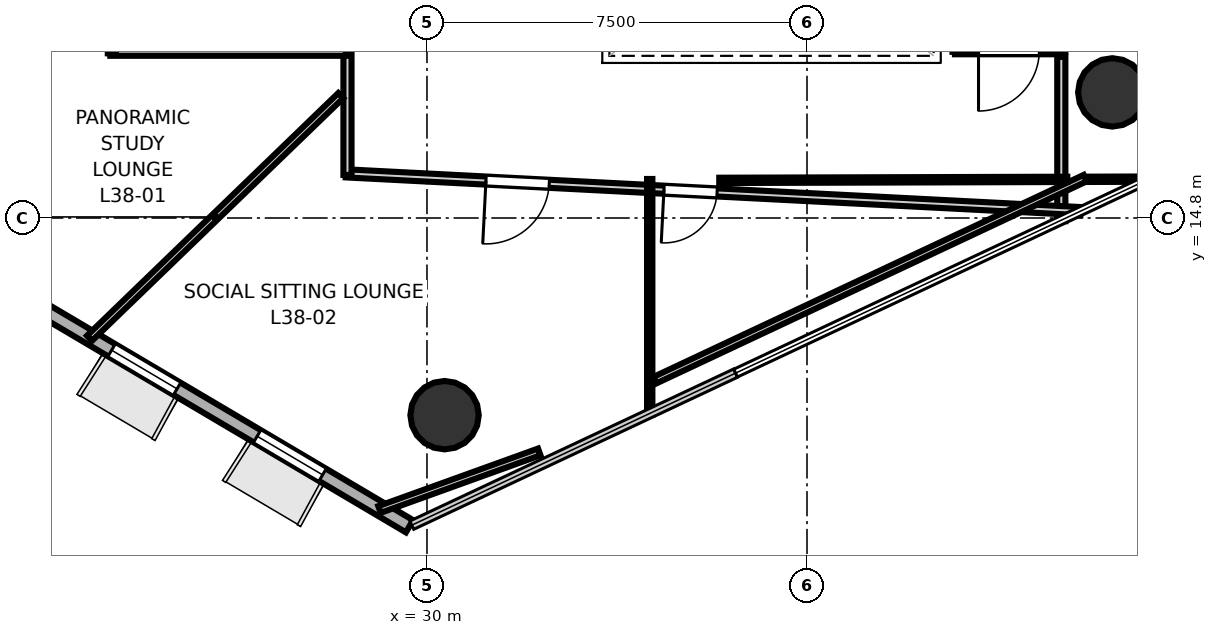
"""IFC4 building model, lengths in metres.
Left out: names, types, materials, properties, quantities, classifications, styles, units other than length and angle.
Written with IfcOpenShell. Run it as: python <this file> out.ifc"""

import sys

from ifc_helpers import new_model, si_unit, direction, frame, frame_2d, origin, origin_2d, place, context, subcontext, project, spatial, rectangle, hollow_circle, extrude, element, fill, save


model = new_model("IFC4")
c1 = context("Model", 3, precision=1e-05, world=origin(), true_north=direction((0.0, 1.0)))
c2 = subcontext(c1, "Body", "Model", "MODEL_VIEW")
j1 = project(units=[si_unit("LENGTHUNIT", "METRE"), si_unit("PLANEANGLEUNIT", "RADIAN")], contexts=[c1])
p1 = place(None, origin())
s1 = spatial("IfcSite", under=j1, at=p1, CompositionType="ELEMENT")
p2 = place(p1, origin())
s2 = spatial("IfcBuilding", under=s1, at=p2, CompositionType="ELEMENT")
p3 = place(p2, frame((0.0, 0.0, 151.3)))
s3 = spatial("IfcBuildingStorey", under=s2, at=p3, CompositionType="ELEMENT", Elevation=151.3)
for number, where, z_axis, x_axis in (
    (1, (30.347, 10.909, 0.0), (0.0, 0.0, 1.0), (1.0, 0.0, 0.0)),
    (2, (43.525, 17.279, 0.0), (0.0, 0.0, 1.0), (1.0, 0.0, 0.0)),
):
    element("IfcColumn", number, at=place(p3, frame(where, z_axis=z_axis, x_axis=x_axis)), inside=s3, PredefinedType="COLUMN", context=c2, shape_type="SweptSolid", body=[
        extrude(hollow_circle(Radius=0.675, WallThickness=0.032, at=origin_2d()), origin(), (0.0, 0.0, 1.0), 3.7),
    ])
p4 = place(p3, frame((21.785, 13.368, 0.0), z_axis=(0.0, 0.0, 1.0), x_axis=(0.860867507506, -0.5088291801, 0.0)))
e3 = element("IfcWall", 3, at=p4, inside=s3, PredefinedType="SOLIDWALL", context=c2, shape_type="SweptSolid", body=[
    extrude(rectangle(XDim=9.142, YDim=0.28, at=frame_2d((4.571, 0.0))), origin(), (0.0, 0.0, 1.0), 3.52),
])
p5 = place(p4, frame((2.312, 0.0, 0.85)))
e4 = element("IfcOpeningElement", 4, at=p5, cuts=e3, PredefinedType="OPENING", context=c2, shape_type="SweptSolid", body=[
    extrude(rectangle(XDim=1.5, YDim=2.1, at=frame_2d((0.75, 1.05))), frame((0.0, 0.15, 0.0), z_axis=(0.0, -1.0, 0.0), x_axis=(1.0, 0.0, 0.0)), (0.0, 0.0, 1.0), 0.3),
])
p6 = place(p4, frame((5.649, 0.0, 0.85)))
e5 = element("IfcOpeningElement", 5, at=p6, cuts=e3, PredefinedType="OPENING", context=c2, shape_type="SweptSolid", body=[
    extrude(rectangle(XDim=1.5, YDim=2.1, at=frame_2d((0.75, 1.05))), frame((0.0, 0.15, 0.0), z_axis=(0.0, -1.0, 0.0), x_axis=(1.0, 0.0, 0.0)), (0.0, 0.0, 1.0), 0.3),
])
p7 = place(p3, frame((42.55, 18.111, 0.0), z_axis=(0.0, 0.0, 1.0), x_axis=(-1.0, 0.0, 0.0)))
e6 = element("IfcWall", 6, at=p7, inside=s3, PredefinedType="PARTITIONING", context=c2, shape_type="SweptSolid", body=[
    extrude(rectangle(XDim=2.13, YDim=0.16, at=frame_2d((1.065, 0.0))), origin(), (0.0, 0.0, 1.0), 2.84),
])
p8 = place(p7, frame((0.465, 0.0, 0.0)))
e7 = element("IfcOpeningElement", 7, at=p8, cuts=e6, PredefinedType="OPENING", context=c2, shape_type="SweptSolid", body=[
    extrude(rectangle(XDim=1.2, YDim=2.15, at=frame_2d((0.6, 1.075))), frame((0.0, 0.09, 0.0), z_axis=(0.0, -1.0, 0.0), x_axis=(1.0, 0.0, 0.0)), (0.0, 0.0, 1.0), 0.18),
])
p9 = place(p3, frame((42.519, 17.98, 0.0), z_axis=(0.0, 0.0, 1.0), x_axis=(0.0, -1.0, 0.0)))
e8 = element("IfcWall", 8, at=p9, inside=s3, PredefinedType="PARTITIONING", context=c2, shape_type="SweptSolid", body=[
    extrude(rectangle(XDim=3.243, YDim=0.16, at=frame_2d((1.621, 0.0))), origin(), (0.0, 0.0, 1.0), 2.84),
])
p10 = place(p3, frame((42.9, 14.936, 0.0), z_axis=(0.0, 0.0, 1.0), x_axis=(-0.998683138802, 0.051302907066, 0.0)))
e9 = element("IfcWall", 9, at=p10, inside=s3, PredefinedType="PARTITIONING", context=c2, shape_type="SweptSolid", body=[
    extrude(rectangle(XDim=14.519, YDim=0.16, at=frame_2d((7.26, 0.0))), origin(), (0.0, 0.0, 1.0), 2.84),
])
p11 = place(p10, frame((10.501, 0.0, 0.0)))
e10 = element("IfcOpeningElement", 10, at=p11, cuts=e9, PredefinedType="OPENING", context=c2, shape_type="SweptSolid", body=[
    extrude(rectangle(XDim=1.25, YDim=2.2, at=frame_2d((0.625, 1.1))), frame((0.0, 0.09, 0.0), z_axis=(0.0, -1.0, 0.0), x_axis=(1.0, 0.0, 0.0)), (0.0, 0.0, 1.0), 0.18),
])
p12 = place(p10, frame((7.184, 0.0, 0.0)))
e11 = element("IfcOpeningElement", 11, at=p12, cuts=e9, PredefinedType="OPENING", context=c2, shape_type="SweptSolid", body=[
    extrude(rectangle(XDim=1.05, YDim=2.15, at=frame_2d((0.525, 1.075))), frame((0.0, 0.09, 0.0), z_axis=(0.0, -1.0, 0.0), x_axis=(1.0, 0.0, 0.0)), (0.0, 0.0, 1.0), 0.18),
])
p13 = place(p3, frame((28.431, 15.65, 0.0), z_axis=(0.0, 0.0, 1.0), x_axis=(0.0, 1.0, 0.0)))
e12 = element("IfcWall", 12, at=p13, inside=s3, PredefinedType="PARTITIONING", context=c2, shape_type="SweptSolid", body=[
    extrude(rectangle(XDim=2.4, YDim=0.16, at=frame_2d((1.2, 0.0))), origin(), (0.0, 0.0, 1.0), 2.84),
])
p14 = place(p3, frame((28.4, 18.081, 0.0), z_axis=(0.0, 0.0, 1.0), x_axis=(-1.0, 0.0, 0.0)))
e13 = element("IfcWall", 13, at=p14, inside=s3, PredefinedType="PARTITIONING", context=c2, shape_type="SweptSolid", body=[
    extrude(rectangle(XDim=4.65, YDim=0.16, at=frame_2d((2.325, 0.0))), origin(), (0.0, 0.0, 1.0), 2.84),
])
p15 = place(p3, frame((23.781, 18.05, 0.0), z_axis=(0.0, 0.0, 1.0), x_axis=(0.0, 1.0, 0.0)))
e14 = element("IfcWall", 14, at=p15, inside=s3, PredefinedType="PARTITIONING", context=c2, shape_type="SweptSolid", body=[
    extrude(rectangle(XDim=5.906, YDim=0.16, at=frame_2d((2.953, 0.0))), origin(), (0.0, 0.0, 1.0), 2.84),
])
p16 = place(p3, frame((28.299, 17.216, 0.0), z_axis=(0.0, 0.0, 1.0), x_axis=(-0.719341653343, -0.694656451611, 0.0)))
e15 = element("IfcWall", 15, at=p16, inside=s3, PredefinedType="PARTITIONING", context=c2, shape_type="SweptSolid", body=[
    extrude(rectangle(XDim=6.894, YDim=0.14, at=frame_2d((3.447, 0.0))), origin(), (0.0, 0.0, 1.0), 2.84),
])
p17 = place(p3, frame((34.396, 15.57, 0.0), z_axis=(0.0, 0.0, 1.0), x_axis=(0.0, -1.0, 0.0)))
e16 = element("IfcWall", 16, at=p17, inside=s3, PredefinedType="PARTITIONING", context=c2, shape_type="SweptSolid", body=[
    extrude(rectangle(XDim=4.647, YDim=0.105, at=frame_2d((2.324, 0.0))), origin(), (0.0, 0.0, 1.0), 2.84),
])
p18 = place(p3, frame((32.216, 10.184, 0.0), z_axis=(0.0, 0.0, 1.0), x_axis=(-0.940725724185, -0.339168264814, 0.0)))
e17 = element("IfcWall", 17, at=p18, inside=s3, PredefinedType="PARTITIONING", context=c2, shape_type="SweptSolid", body=[
    extrude(rectangle(XDim=3.352, YDim=0.14, at=frame_2d((1.676, 0.0))), origin(), (0.0, 0.0, 1.0), 2.84),
])
p19 = place(p3, frame((42.99, 15.587, 0.0), z_axis=(0.0, 0.0, 1.0), x_axis=(-0.905178107645, -0.42503246163, 0.0)))
e18 = element("IfcWall", 18, at=p19, inside=s3, PredefinedType="PARTITIONING", context=c2, shape_type="SweptSolid", body=[
    extrude(rectangle(XDim=9.382, YDim=0.14, at=frame_2d((4.691, 0.0))), origin(), (0.0, 0.0, 1.0), 2.84),
])
p20 = place(p3, frame((35.768, 15.543, 0.0), z_axis=(0.0, 0.0, 1.0), x_axis=(0.999995856362, 0.002878759795, 0.0)))
e19 = element("IfcWall", 19, at=p20, inside=s3, PredefinedType="PARTITIONING", context=c2, shape_type="SweptSolid", body=[
    extrude(rectangle(XDim=6.869, YDim=0.105, at=frame_2d((3.435, 0.0))), origin(), (0.0, 0.0, 1.0), 2.84),
])
p21 = place(p3, frame((43.002, 15.563, 0.0), z_axis=(0.0, 0.0, 1.0), x_axis=(0.99999578947, 0.002901903045, 0.0)))
e20 = element("IfcWall", 20, at=p21, inside=s3, PredefinedType="PARTITIONING", context=c2, shape_type="SweptSolid", body=[
    extrude(rectangle(XDim=1.262, YDim=0.105, at=frame_2d((0.631, 0.0))), origin(), (0.0, 0.0, 1.0), 2.84),
])
p22 = place(p11, origin())
e21 = element("IfcDoor", 21, at=p22, inside=s3, OperationType="SINGLE_SWING_RIGHT", PredefinedType="DOOR", context=c2, shape_type="SweptSolid", body=[
    extrude(rectangle(XDim=1.25, YDim=2.2, at=frame_2d((0.625, 1.1))), frame((0.0, 0.025, 0.0), z_axis=(0.0, -1.0, 0.0), x_axis=(1.0, 0.0, 0.0)), (0.0, 0.0, 1.0), 0.05),
])
fill(e10, e21)
p23 = place(p12, origin())
e22 = element("IfcDoor", 22, at=p23, inside=s3, OperationType="SINGLE_SWING_RIGHT", PredefinedType="DOOR", context=c2, shape_type="SweptSolid", body=[
    extrude(rectangle(XDim=1.05, YDim=2.15, at=frame_2d((0.525, 1.075))), frame((0.0, 0.025, 0.0), z_axis=(0.0, -1.0, 0.0), x_axis=(1.0, 0.0, 0.0)), (0.0, 0.0, 1.0), 0.05),
])
fill(e11, e22)
p24 = place(p5, origin())
e23 = element("IfcWindow", 23, at=p24, inside=s3, PartitioningType="SINGLE_PANEL", PredefinedType="WINDOW", context=c2, shape_type="SweptSolid", body=[
    extrude(rectangle(XDim=1.5, YDim=2.1, at=frame_2d((0.75, 1.05))), frame((0.0, 0.03, 0.0), z_axis=(0.0, -1.0, 0.0), x_axis=(1.0, 0.0, 0.0)), (0.0, 0.0, 1.0), 0.06),
])
fill(e4, e23)
p25 = place(p6, origin())
e24 = element("IfcWindow", 24, at=p25, inside=s3, PartitioningType="SINGLE_PANEL", PredefinedType="WINDOW", context=c2, shape_type="SweptSolid", body=[
    extrude(rectangle(XDim=1.5, YDim=2.1, at=frame_2d((0.75, 1.05))), frame((0.0, 0.03, 0.0), z_axis=(0.0, -1.0, 0.0), x_axis=(1.0, 0.0, 0.0)), (0.0, 0.0, 1.0), 0.06),
])
fill(e5, e24)
save(model, sys.argv[1])
